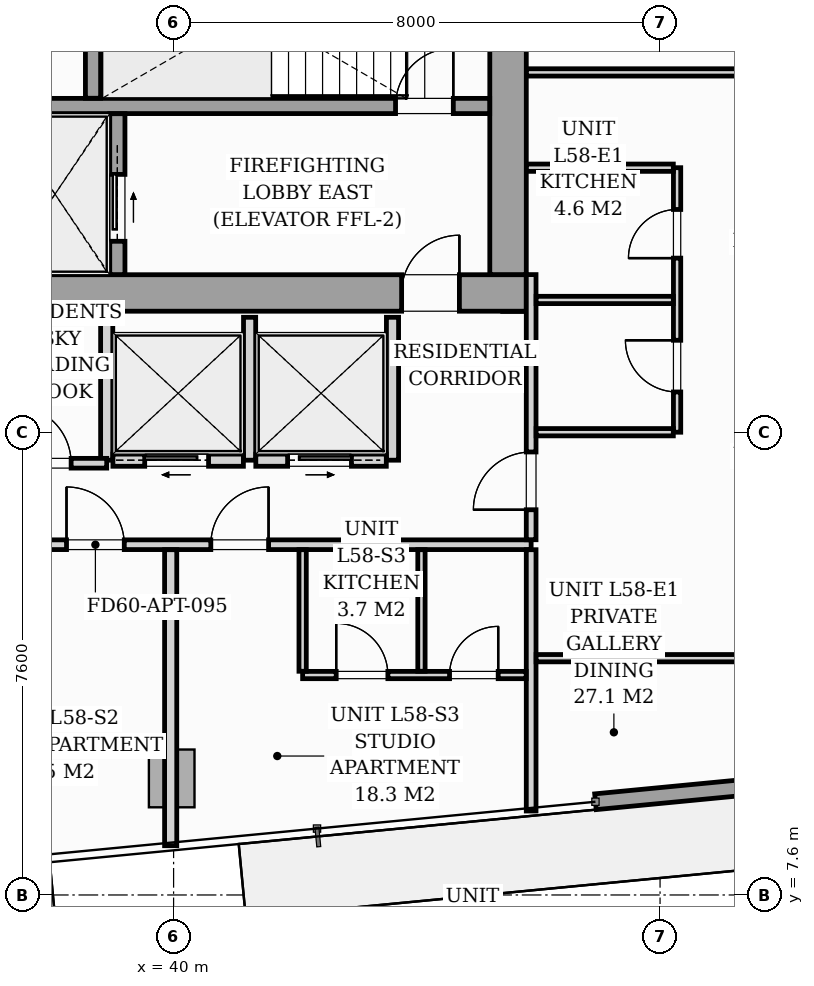
"""IFC4 building model, lengths in metres.
Left out: names, types, materials, properties, quantities, classifications, styles, units other than length and angle.
Written with IfcOpenShell. Run it as: python <this file> out.ifc"""

import sys

from ifc_helpers import new_model, si_unit, direction, frame, frame_2d, origin, origin_2d, place, context, subcontext, project, spatial, rectangle, i_section, extrude, source, transform, mapped, element, fill, save


model = new_model("IFC4")
c1 = context("Model", 3, precision=1e-05, world=origin(), true_north=direction((0.0, 1.0)))
c2 = subcontext(c1, "Body", "Model", "MODEL_VIEW")
j1 = project(units=[si_unit("LENGTHUNIT", "METRE"), si_unit("PLANEANGLEUNIT", "RADIAN")], contexts=[c1])
p1 = place(None, origin())
s1 = spatial("IfcSite", under=j1, at=p1, CompositionType="ELEMENT")
p2 = place(p1, origin())
s2 = spatial("IfcBuilding", under=s1, at=p2, CompositionType="ELEMENT")
p3 = place(p2, frame((0.0, 0.0, 201.8)))
s3 = spatial("IfcBuildingStorey", under=s2, at=p3, CompositionType="ELEMENT", Elevation=201.8)
m1 = source(origin(), c2, "Body", "SweptSolid", [
    extrude(i_section(OverallWidth=0.416, OverallDepth=0.446, WebThickness=0.039, FlangeThickness=0.063, FilletRadius=0.018, at=origin_2d()), origin(), (0.0, 0.0, 1.0), 3.196),
])
for number, where, z_axis, x_axis in (
    (1, (38.88, 17.4, 0.002), (0.0, 0.0, 1.0), (1.0, 0.0, 0.0)),
    (2, (45.6, 17.4, 0.002), (0.0, 0.0, 1.0), (1.0, 0.0, 0.0)),
):
    element("IfcColumn", number, at=place(p3, frame(where, z_axis=z_axis, x_axis=x_axis)), inside=s3, PredefinedType="PILASTER", context=c2, shape_type="MappedRepresentation", body=[
        mapped(m1, transform((0.0, 0.0, 0.0), scale=1.0)),
    ])
m2 = source(origin(), c2, "Body", "SweptSolid", [
    extrude(rectangle(XDim=0.75, YDim=0.95, at=origin_2d()), origin(), (0.0, 0.0, 1.0), 3.196),
])
p4 = place(p3, frame((39.969, 9.517, 0.002), z_axis=(0.0, 0.0, 1.0), x_axis=(0.995396198367, 0.09584575252, 0.0)))
e3 = element("IfcColumn", 3, at=p4, inside=s3, PredefinedType="COLUMN", context=c2, shape_type="MappedRepresentation", body=[
    mapped(m2, transform((0.0, 0.0, 0.0), scale=1.0)),
])
p5 = place(p3, frame((62.963, 10.676, 0.0), z_axis=(0.0, 0.0, 1.0), x_axis=(-0.995395627913, -0.095851676732, 0.0)))
e4 = element("IfcWall", 4, at=p5, inside=s3, PredefinedType="STANDARD", context=c2, shape_type="SweptSolid", body=[
    extrude(rectangle(XDim=16.1, YDim=0.26, at=frame_2d((8.05, 0.0))), origin(), (0.0, 0.0, 1.0), 2.94),
])
p6 = place(p5, frame((7.443, 0.0, 0.0)))
e5 = element("IfcOpeningElement", 5, at=p6, cuts=e4, PredefinedType="OPENING", context=c2, shape_type="SweptSolid", body=[
    extrude(rectangle(XDim=1.8, YDim=2.06, at=frame_2d((0.9, 1.03))), frame((0.0, 0.14, 0.0), z_axis=(0.0, -1.0, 0.0), x_axis=(1.0, 0.0, 0.0)), (0.0, 0.0, 1.0), 0.28),
])
p7 = place(p5, frame((2.05, 0.0, 0.65)))
e6 = element("IfcOpeningElement", 6, at=p7, cuts=e4, PredefinedType="OPENING", context=c2, shape_type="SweptSolid", body=[
    extrude(rectangle(XDim=1.6, YDim=1.5, at=frame_2d((0.8, 0.75))), frame((0.0, 0.14, 0.0), z_axis=(0.0, -1.0, 0.0), x_axis=(1.0, 0.0, 0.0)), (0.0, 0.0, 1.0), 0.28),
])
p8 = place(p3, frame((26.2, 17.5, 0.0), z_axis=(0.0, 0.0, 1.0), x_axis=(1.0, 0.0, 0.0)))
e7 = element("IfcWall", 7, at=p8, inside=s3, PredefinedType="SHEAR", context=c2, shape_type="SweptSolid", body=[
    extrude(rectangle(XDim=19.6, YDim=0.6, at=frame_2d((9.8, 0.0))), origin(), (0.0, 0.0, 1.0), 3.2),
])
p9 = place(p8, frame((0.95, 0.0, 0.0)))
e8 = element("IfcOpeningElement", 8, at=p9, cuts=e7, PredefinedType="OPENING", context=c2, shape_type="SweptSolid", body=[
    extrude(rectangle(XDim=0.95, YDim=2.06, at=frame_2d((0.475, 1.03))), frame((0.0, 0.31, 0.0), z_axis=(0.0, -1.0, 0.0), x_axis=(1.0, 0.0, 0.0)), (0.0, 0.0, 1.0), 0.62),
])
p10 = place(p8, frame((9.38, 0.0, 0.0)))
e9 = element("IfcOpeningElement", 9, at=p10, cuts=e7, PredefinedType="OPENING", context=c2, shape_type="SweptSolid", body=[
    extrude(rectangle(XDim=0.85, YDim=2.0, at=frame_2d((0.425, 1.0))), frame((0.0, 0.31, 0.0), z_axis=(0.0, -1.0, 0.0), x_axis=(1.0, 0.0, 0.0)), (0.0, 0.0, 1.0), 0.62),
])
p11 = place(p8, frame((17.55, 0.0, 0.0)))
e10 = element("IfcOpeningElement", 10, at=p11, cuts=e7, PredefinedType="OPENING", context=c2, shape_type="SweptSolid", body=[
    extrude(rectangle(XDim=0.95, YDim=2.06, at=frame_2d((0.475, 1.03))), frame((0.0, 0.31, 0.0), z_axis=(0.0, -1.0, 0.0), x_axis=(1.0, 0.0, 0.0)), (0.0, 0.0, 1.0), 0.62),
])
p12 = place(p3, frame((45.5, 17.802, 0.0), z_axis=(0.0, 0.0, 1.0), x_axis=(0.0, 1.0, 0.0)))
e11 = element("IfcWall", 11, at=p12, inside=s3, PredefinedType="SHEAR", context=c2, shape_type="SweptSolid", body=[
    extrude(rectangle(XDim=5.796, YDim=0.6, at=frame_2d((2.898, 0.0))), origin(), (0.0, 0.0, 1.0), 3.2),
])
p13 = place(p3, frame((37.05, 20.575, 0.0), z_axis=(0.0, 0.0, 1.0), x_axis=(1.0, 0.0, 0.0)))
e12 = element("IfcWall", 12, at=p13, inside=s3, PredefinedType="SOLIDWALL", context=c2, shape_type="SweptSolid", body=[
    extrude(rectangle(XDim=8.148, YDim=0.25, at=frame_2d((4.074, 0.0))), origin(), (0.0, 0.0, 1.0), 3.2),
])
p14 = place(p13, frame((6.6, 0.0, 0.0)))
e13 = element("IfcOpeningElement", 13, at=p14, cuts=e12, PredefinedType="OPENING", context=c2, shape_type="SweptSolid", body=[
    extrude(rectangle(XDim=0.95, YDim=2.06, at=frame_2d((0.475, 1.03))), frame((0.0, 0.135, 0.0), z_axis=(0.0, -1.0, 0.0), x_axis=(1.0, 0.0, 0.0)), (0.0, 0.0, 1.0), 0.27),
])
p15 = place(p3, frame((38.675, 20.702, 0.0), z_axis=(0.0, 0.0, 1.0), x_axis=(0.0, 1.0, 0.0)))
e14 = element("IfcWall", 14, at=p15, inside=s3, PredefinedType="SOLIDWALL", context=c2, shape_type="SweptSolid", body=[
    extrude(rectangle(XDim=2.896, YDim=0.25, at=frame_2d((1.448, 0.0))), origin(), (0.0, 0.0, 1.0), 3.2),
])
p16 = place(p3, frame((39.075, 17.802, 0.0), z_axis=(0.0, 0.0, 1.0), x_axis=(0.0, 1.0, 0.0)))
e15 = element("IfcWall", 15, at=p16, inside=s3, PredefinedType="SOLIDWALL", context=c2, shape_type="SweptSolid", body=[
    extrude(rectangle(XDim=2.646, YDim=0.25, at=frame_2d((1.323, 0.0))), origin(), (0.0, 0.0, 1.0), 3.2),
])
p17 = place(p16, frame((0.548, 0.0, 0.0)))
e16 = element("IfcOpeningElement", 16, at=p17, cuts=e15, PredefinedType="OPENING", context=c2, shape_type="SweptSolid", body=[
    extrude(rectangle(XDim=1.1, YDim=2.08, at=frame_2d((0.55, 1.04))), frame((0.0, 0.135, 0.0), z_axis=(0.0, -1.0, 0.0), x_axis=(1.0, 0.0, 0.0)), (0.0, 0.0, 1.0), 0.27),
])
for number, where, z_axis, x_axis in (
    (17, (38.9, 14.75, 0.0), (0.0, 0.0, 1.0), (0.0, 1.0, 0.0)),
    (18, (41.25, 14.75, 0.0), (0.0, 0.0, 1.0), (0.0, 1.0, 0.0)),
    (19, (43.6, 14.75, 0.0), (0.0, 0.0, 1.0), (0.0, 1.0, 0.0)),
):
    element("IfcWall", number, at=place(p3, frame(where, z_axis=z_axis, x_axis=x_axis)), inside=s3, PredefinedType="PARTITIONING", context=c2, shape_type="SweptSolid", body=[
        extrude(rectangle(XDim=2.35, YDim=0.2, at=frame_2d((1.175, 0.0))), origin(), (0.0, 0.0, 1.0), 2.94),
    ])
p18 = place(p3, frame((39.002, 14.75, 0.0), z_axis=(0.0, 0.0, 1.0), x_axis=(1.0, 0.0, 0.0)))
e20 = element("IfcWall", 20, at=p18, inside=s3, PredefinedType="PARTITIONING", context=c2, shape_type="SweptSolid", body=[
    extrude(rectangle(XDim=2.146, YDim=0.2, at=frame_2d((1.073, 0.0))), origin(), (0.0, 0.0, 1.0), 2.94),
])
p19 = place(p18, frame((0.523, 0.0, 0.0)))
e21 = element("IfcOpeningElement", 21, at=p19, cuts=e20, PredefinedType="OPENING", context=c2, shape_type="SweptSolid", body=[
    extrude(rectangle(XDim=1.05, YDim=2.08, at=frame_2d((0.525, 1.04))), frame((0.0, 0.11, 0.0), z_axis=(0.0, -1.0, 0.0), x_axis=(1.0, 0.0, 0.0)), (0.0, 0.0, 1.0), 0.22),
])
p20 = place(p3, frame((41.352, 14.75, 0.0), z_axis=(0.0, 0.0, 1.0), x_axis=(1.0, 0.0, 0.0)))
e22 = element("IfcWall", 22, at=p20, inside=s3, PredefinedType="PARTITIONING", context=c2, shape_type="SweptSolid", body=[
    extrude(rectangle(XDim=2.146, YDim=0.2, at=frame_2d((1.073, 0.0))), origin(), (0.0, 0.0, 1.0), 2.94),
])
p21 = place(p20, frame((0.523, 0.0, 0.0)))
e23 = element("IfcOpeningElement", 23, at=p21, cuts=e22, PredefinedType="OPENING", context=c2, shape_type="SweptSolid", body=[
    extrude(rectangle(XDim=1.05, YDim=2.08, at=frame_2d((0.525, 1.04))), frame((0.0, 0.11, 0.0), z_axis=(0.0, -1.0, 0.0), x_axis=(1.0, 0.0, 0.0)), (0.0, 0.0, 1.0), 0.22),
])
p22 = place(p3, frame((26.12, 13.36, 0.0), z_axis=(0.0, 0.0, 1.0), x_axis=(1.0, 0.0, 0.0)))
e24 = element("IfcWall", 24, at=p22, inside=s3, PredefinedType="PARTITIONING", context=c2, shape_type="SweptSolid", body=[
    extrude(rectangle(XDim=19.76, YDim=0.16, at=frame_2d((9.88, 0.0))), origin(), (0.0, 0.0, 1.0), 2.94),
])
p23 = place(p22, frame((5.221, 0.0, 0.0)))
e25 = element("IfcOpeningElement", 25, at=p23, cuts=e24, PredefinedType="OPENING", context=c2, shape_type="SweptSolid", body=[
    extrude(rectangle(XDim=0.95, YDim=2.06, at=frame_2d((0.475, 1.03))), frame((0.0, 0.09, 0.0), z_axis=(0.0, -1.0, 0.0), x_axis=(1.0, 0.0, 0.0)), (0.0, 0.0, 1.0), 0.18),
])
p24 = place(p22, frame((12.119, 0.0, 0.0)))
e26 = element("IfcOpeningElement", 26, at=p24, cuts=e24, PredefinedType="OPENING", context=c2, shape_type="SweptSolid", body=[
    extrude(rectangle(XDim=0.95, YDim=2.06, at=frame_2d((0.475, 1.03))), frame((0.0, 0.09, 0.0), z_axis=(0.0, -1.0, 0.0), x_axis=(1.0, 0.0, 0.0)), (0.0, 0.0, 1.0), 0.18),
])
p25 = place(p22, frame((14.492, 0.0, 0.0)))
e27 = element("IfcOpeningElement", 27, at=p25, cuts=e24, PredefinedType="OPENING", context=c2, shape_type="SweptSolid", body=[
    extrude(rectangle(XDim=0.95, YDim=2.06, at=frame_2d((0.475, 1.03))), frame((0.0, 0.09, 0.0), z_axis=(0.0, -1.0, 0.0), x_axis=(1.0, 0.0, 0.0)), (0.0, 0.0, 1.0), 0.18),
])
p26 = place(p3, frame((45.88, 8.981, 0.0), z_axis=(0.0, 0.0, 1.0), x_axis=(0.0, 1.0, 0.0)))
e28 = element("IfcWall", 28, at=p26, inside=s3, PredefinedType="PARTITIONING", context=c2, shape_type="SweptSolid", body=[
    extrude(rectangle(XDim=4.297, YDim=0.16, at=frame_2d((2.148, 0.0))), origin(), (0.0, 0.0, 1.0), 2.94),
])
p27 = place(p3, frame((45.88, 13.442, 0.0), z_axis=(0.0, 0.0, 1.0), x_axis=(0.0, 1.0, 0.0)))
e29 = element("IfcWall", 29, at=p27, inside=s3, PredefinedType="PARTITIONING", context=c2, shape_type="SweptSolid", body=[
    extrude(rectangle(XDim=4.36, YDim=0.16, at=frame_2d((2.18, 0.0))), origin(), (0.0, 0.0, 1.0), 2.94),
])
p28 = place(p27, frame((0.493, 0.0, 0.0)))
e30 = element("IfcOpeningElement", 30, at=p28, cuts=e29, PredefinedType="OPENING", context=c2, shape_type="SweptSolid", body=[
    extrude(rectangle(XDim=0.95, YDim=2.06, at=frame_2d((0.475, 1.03))), frame((0.0, 0.09, 0.0), z_axis=(0.0, -1.0, 0.0), x_axis=(1.0, 0.0, 0.0)), (0.0, 0.0, 1.0), 0.18),
])
p29 = place(p3, frame((39.952, 8.41, 0.0), z_axis=(0.0, 0.0, 1.0), x_axis=(0.0, 1.0, 0.0)))
e31 = element("IfcWall", 31, at=p29, inside=s3, PredefinedType="PARTITIONING", context=c2, shape_type="SweptSolid", body=[
    extrude(rectangle(XDim=4.868, YDim=0.2, at=frame_2d((2.434, 0.0))), origin(), (0.0, 0.0, 1.0), 2.94),
])
p30 = place(p3, frame((42.122, 11.217, 0.0), z_axis=(0.0, 0.0, 1.0), x_axis=(1.0, 0.0, 0.0)))
e32 = element("IfcWall", 32, at=p30, inside=s3, PredefinedType="PARTITIONING", context=c2, shape_type="SweptSolid", body=[
    extrude(rectangle(XDim=3.676, YDim=0.12, at=frame_2d((1.838, 0.0))), origin(), (0.0, 0.0, 1.0), 2.94),
])
p31 = place(p30, frame((0.552, 0.0, 0.0)))
e33 = element("IfcOpeningElement", 33, at=p31, cuts=e32, PredefinedType="OPENING", context=c2, shape_type="SweptSolid", body=[
    extrude(rectangle(XDim=0.85, YDim=2.05, at=frame_2d((0.425, 1.025))), frame((0.0, 0.07, 0.0), z_axis=(0.0, -1.0, 0.0), x_axis=(1.0, 0.0, 0.0)), (0.0, 0.0, 1.0), 0.14),
])
p32 = place(p30, frame((2.416, 0.0, 0.0)))
e34 = element("IfcOpeningElement", 34, at=p32, cuts=e32, PredefinedType="OPENING", context=c2, shape_type="SweptSolid", body=[
    extrude(rectangle(XDim=0.8, YDim=2.02, at=frame_2d((0.4, 1.01))), frame((0.0, 0.07, 0.0), z_axis=(0.0, -1.0, 0.0), x_axis=(1.0, 0.0, 0.0)), (0.0, 0.0, 1.0), 0.14),
])
for number, where, z_axis, x_axis in (
    (35, (42.122, 11.279, 0.0), (0.0, 0.0, 1.0), (0.0, 1.0, 0.0)),
    (36, (44.076, 11.279, 0.0), (0.0, 0.0, 1.0), (0.0, 1.0, 0.0)),
):
    element("IfcWall", number, at=place(p3, frame(where, z_axis=z_axis, x_axis=x_axis)), inside=s3, PredefinedType="PARTITIONING", context=c2, shape_type="SweptSolid", body=[
        extrude(rectangle(XDim=1.999, YDim=0.12, at=frame_2d((1.0, 0.0))), origin(), (0.0, 0.0, 1.0), 2.94),
    ])
p33 = place(p3, frame((48.28, 15.21, 0.0), z_axis=(0.0, 0.0, 1.0), x_axis=(0.0, 1.0, 0.0)))
e37 = element("IfcWall", 37, at=p33, inside=s3, PredefinedType="PARTITIONING", context=c2, shape_type="SweptSolid", body=[
    extrude(rectangle(XDim=4.35, YDim=0.12, at=frame_2d((2.175, 0.0))), origin(), (0.0, 0.0, 1.0), 2.94),
])
p34 = place(p33, frame((0.662, 0.0, 0.0)))
e38 = element("IfcOpeningElement", 38, at=p34, cuts=e37, PredefinedType="OPENING", context=c2, shape_type="SweptSolid", body=[
    extrude(rectangle(XDim=0.85, YDim=2.05, at=frame_2d((0.425, 1.025))), frame((0.0, 0.07, 0.0), z_axis=(0.0, -1.0, 0.0), x_axis=(1.0, 0.0, 0.0)), (0.0, 0.0, 1.0), 0.14),
])
p35 = place(p33, frame((2.863, 0.0, 0.0)))
e39 = element("IfcOpeningElement", 39, at=p35, cuts=e37, PredefinedType="OPENING", context=c2, shape_type="SweptSolid", body=[
    extrude(rectangle(XDim=0.8, YDim=2.02, at=frame_2d((0.4, 1.01))), frame((0.0, 0.07, 0.0), z_axis=(0.0, -1.0, 0.0), x_axis=(1.0, 0.0, 0.0)), (0.0, 0.0, 1.0), 0.14),
])
p36 = place(p3, frame((45.962, 17.385, 0.0), z_axis=(0.0, 0.0, 1.0), x_axis=(1.0, 0.0, 0.0)))
e40 = element("IfcWall", 40, at=p36, inside=s3, PredefinedType="PARTITIONING", context=c2, shape_type="SweptSolid", body=[
    extrude(rectangle(XDim=2.256, YDim=0.12, at=frame_2d((1.128, 0.0))), origin(), (0.0, 0.0, 1.0), 2.281),
])
p37 = place(p3, frame((45.962, 15.21, 0.0), z_axis=(0.0, 0.0, 1.0), x_axis=(1.0, 0.0, 0.0)))
e41 = element("IfcWall", 41, at=p37, inside=s3, PredefinedType="PARTITIONING", context=c2, shape_type="SweptSolid", body=[
    extrude(rectangle(XDim=2.256, YDim=0.12, at=frame_2d((1.128, 0.0))), origin(), (0.0, 0.0, 1.0), 2.94),
])
p38 = place(p3, frame((45.802, 19.56, 0.0), z_axis=(0.0, 0.0, 1.0), x_axis=(1.0, 0.0, 0.0)))
e42 = element("IfcWall", 42, at=p38, inside=s3, PredefinedType="PARTITIONING", context=c2, shape_type="SweptSolid", body=[
    extrude(rectangle(XDim=2.416, YDim=0.12, at=frame_2d((1.208, 0.0))), origin(), (0.0, 0.0, 1.0), 2.94),
])
p39 = place(p3, frame((45.962, 11.494, 0.0), z_axis=(0.0, 0.0, 1.0), x_axis=(1.0, 0.0, 0.0)))
e43 = element("IfcWall", 43, at=p39, inside=s3, PredefinedType="PARTITIONING", context=c2, shape_type="SweptSolid", body=[
    extrude(rectangle(XDim=16.66, YDim=0.12, at=frame_2d((8.33, 0.0))), origin(), (0.0, 0.0, 1.0), 2.383),
])
p40 = place(p39, frame((6.186, 0.0, 0.0)))
e44 = element("IfcOpeningElement", 44, at=p40, cuts=e43, PredefinedType="OPENING", context=c2, shape_type="SweptSolid", body=[
    extrude(rectangle(XDim=0.85, YDim=2.05, at=frame_2d((0.425, 1.025))), frame((0.0, 0.07, 0.0), z_axis=(0.0, -1.0, 0.0), x_axis=(1.0, 0.0, 0.0)), (0.0, 0.0, 1.0), 0.14),
])
p41 = place(p3, frame((45.802, 21.127, 0.0), z_axis=(0.0, 0.0, 1.0), x_axis=(1.0, 0.0, 0.0)))
e45 = element("IfcWall", 45, at=p41, inside=s3, PredefinedType="PARTITIONING", context=c2, shape_type="SweptSolid", body=[
    extrude(rectangle(XDim=18.586, YDim=0.12, at=frame_2d((9.293, 0.0))), origin(), (0.0, 0.0, 1.0), 2.94),
])
p42 = place(p41, frame((8.954, 0.0, 0.0)))
e46 = element("IfcOpeningElement", 46, at=p42, cuts=e45, PredefinedType="OPENING", context=c2, shape_type="SweptSolid", body=[
    extrude(rectangle(XDim=0.85, YDim=2.05, at=frame_2d((0.425, 1.025))), frame((0.0, 0.07, 0.0), z_axis=(0.0, -1.0, 0.0), x_axis=(1.0, 0.0, 0.0)), (0.0, 0.0, 1.0), 0.14),
])
p43 = place(p3, frame((36.882, 14.7, 0.0), z_axis=(0.0, 0.0, 1.0), x_axis=(1.0, 0.0, 0.0)))
e47 = element("IfcWall", 47, at=p43, inside=s3, PredefinedType="PARTITIONING", context=c2, shape_type="SweptSolid", body=[
    extrude(rectangle(XDim=2.018, YDim=0.16, at=frame_2d((1.009, 0.0))), origin(), (0.0, 0.0, 1.0), 2.94),
])
p44 = place(p43, frame((0.483, 0.0, 0.0)))
e48 = element("IfcOpeningElement", 48, at=p44, cuts=e47, PredefinedType="OPENING", context=c2, shape_type="SweptSolid", body=[
    extrude(rectangle(XDim=0.95, YDim=2.06, at=frame_2d((0.475, 1.03))), frame((0.0, 0.09, 0.0), z_axis=(0.0, -1.0, 0.0), x_axis=(1.0, 0.0, 0.0)), (0.0, 0.0, 1.0), 0.18),
])
m3 = source(origin(), c2, "Body", "SweptSolid", [
    extrude(rectangle(XDim=0.95, YDim=2.06, at=frame_2d((0.475, 1.03))), frame((0.0, 0.025, 0.0), z_axis=(0.0, -1.0, 0.0), x_axis=(1.0, 0.0, 0.0)), (0.0, 0.0, 1.0), 0.05),
])
p45 = place(p11, origin())
e49 = element("IfcDoor", 49, at=p45, inside=s3, OperationType="SINGLE_SWING_RIGHT", PredefinedType="DOOR", context=c2, shape_type="MappedRepresentation", body=[
    mapped(m3, transform((0.0, 0.0, 0.0), scale=1.0)),
])
fill(e10, e49)
p46 = place(p14, origin())
e50 = element("IfcDoor", 50, at=p46, inside=s3, OperationType="SINGLE_SWING_RIGHT", PredefinedType="DOOR", context=c2, shape_type="MappedRepresentation", body=[
    mapped(m3, transform((0.0, 0.0, 0.0), scale=1.0)),
])
fill(e13, e50)
m4 = source(origin(), c2, "Body", "SweptSolid", [
    extrude(rectangle(XDim=1.1, YDim=2.08, at=frame_2d((0.55, 1.04))), frame((0.0, 0.025, 0.0), z_axis=(0.0, -1.0, 0.0), x_axis=(1.0, 0.0, 0.0)), (0.0, 0.0, 1.0), 0.05),
])
p47 = place(p17, origin())
e51 = element("IfcDoor", 51, at=p47, inside=s3, OperationType="SLIDING_TO_RIGHT", PredefinedType="DOOR", context=c2, shape_type="MappedRepresentation", body=[
    mapped(m4, transform((0.0, 0.0, 0.0), scale=1.0)),
])
fill(e16, e51)
m5 = source(origin(), c2, "Body", "SweptSolid", [
    extrude(rectangle(XDim=1.05, YDim=2.08, at=frame_2d((0.525, 1.04))), frame((0.0, 0.025, 0.0), z_axis=(0.0, -1.0, 0.0), x_axis=(1.0, 0.0, 0.0)), (0.0, 0.0, 1.0), 0.05),
])
p48 = place(p19, origin())
e52 = element("IfcDoor", 52, at=p48, inside=s3, OperationType="SLIDING_TO_LEFT", PredefinedType="DOOR", context=c2, shape_type="MappedRepresentation", body=[
    mapped(m5, transform((0.0, 0.0, 0.0), scale=1.0)),
])
fill(e21, e52)
p49 = place(p21, origin())
e53 = element("IfcDoor", 53, at=p49, inside=s3, OperationType="SLIDING_TO_RIGHT", PredefinedType="DOOR", context=c2, shape_type="MappedRepresentation", body=[
    mapped(m5, transform((0.0, 0.0, 0.0), scale=1.0)),
])
fill(e23, e53)
m6 = source(origin(), c2, "Body", "SweptSolid", [
    extrude(rectangle(XDim=0.95, YDim=2.06, at=frame_2d((0.475, 1.03))), frame((0.0, 0.025, 0.0), z_axis=(0.0, -1.0, 0.0), x_axis=(1.0, 0.0, 0.0)), (0.0, 0.0, 1.0), 0.05),
])
p50 = place(p24, origin())
e54 = element("IfcDoor", 54, at=p50, inside=s3, OperationType="SINGLE_SWING_LEFT", PredefinedType="DOOR", context=c2, shape_type="MappedRepresentation", body=[
    mapped(m6, transform((0.0, 0.0, 0.0), scale=1.0)),
])
fill(e26, e54)
p51 = place(p25, origin())
e55 = element("IfcDoor", 55, at=p51, inside=s3, OperationType="SINGLE_SWING_RIGHT", PredefinedType="DOOR", context=c2, shape_type="MappedRepresentation", body=[
    mapped(m6, transform((0.0, 0.0, 0.0), scale=1.0)),
])
fill(e27, e55)
m7 = source(origin(), c2, "Body", "SweptSolid", [
    extrude(rectangle(XDim=0.85, YDim=2.05, at=frame_2d((0.425, 1.025))), frame((0.0, 0.025, 0.0), z_axis=(0.0, -1.0, 0.0), x_axis=(1.0, 0.0, 0.0)), (0.0, 0.0, 1.0), 0.05),
])
p52 = place(p31, origin())
e56 = element("IfcDoor", 56, at=p52, inside=s3, OperationType="SINGLE_SWING_LEFT", PredefinedType="DOOR", context=c2, shape_type="MappedRepresentation", body=[
    mapped(m7, transform((0.0, 0.0, 0.0), scale=1.0)),
])
fill(e33, e56)
m8 = source(origin(), c2, "Body", "SweptSolid", [
    extrude(rectangle(XDim=0.8, YDim=2.02, at=frame_2d((0.4, 1.01))), frame((0.0, 0.025, 0.0), z_axis=(0.0, -1.0, 0.0), x_axis=(1.0, 0.0, 0.0)), (0.0, 0.0, 1.0), 0.05),
])
p53 = place(p32, origin())
e57 = element("IfcDoor", 57, at=p53, inside=s3, OperationType="SINGLE_SWING_RIGHT", PredefinedType="DOOR", context=c2, shape_type="MappedRepresentation", body=[
    mapped(m8, transform((0.0, 0.0, 0.0), scale=1.0)),
])
fill(e34, e57)
p54 = place(p28, origin())
e58 = element("IfcDoor", 58, at=p54, inside=s3, OperationType="SINGLE_SWING_LEFT", PredefinedType="DOOR", context=c2, shape_type="MappedRepresentation", body=[
    mapped(m6, transform((0.0, 0.0, 0.0), scale=1.0)),
])
fill(e30, e58)
p55 = place(p34, origin())
e59 = element("IfcDoor", 59, at=p55, inside=s3, OperationType="SINGLE_SWING_RIGHT", PredefinedType="DOOR", context=c2, shape_type="MappedRepresentation", body=[
    mapped(m7, transform((0.0, 0.0, 0.0), scale=1.0)),
])
fill(e38, e59)
p56 = place(p35, origin())
e60 = element("IfcDoor", 60, at=p56, inside=s3, OperationType="SINGLE_SWING_LEFT", PredefinedType="DOOR", context=c2, shape_type="MappedRepresentation", body=[
    mapped(m8, transform((0.0, 0.0, 0.0), scale=1.0)),
])
fill(e39, e60)
p57 = place(p44, origin())
e61 = element("IfcDoor", 61, at=p57, inside=s3, OperationType="SINGLE_SWING_LEFT", PredefinedType="DOOR", context=c2, shape_type="MappedRepresentation", body=[
    mapped(m6, transform((0.0, 0.0, 0.0), scale=1.0)),
])
fill(e48, e61)
save(model, sys.argv[1])
